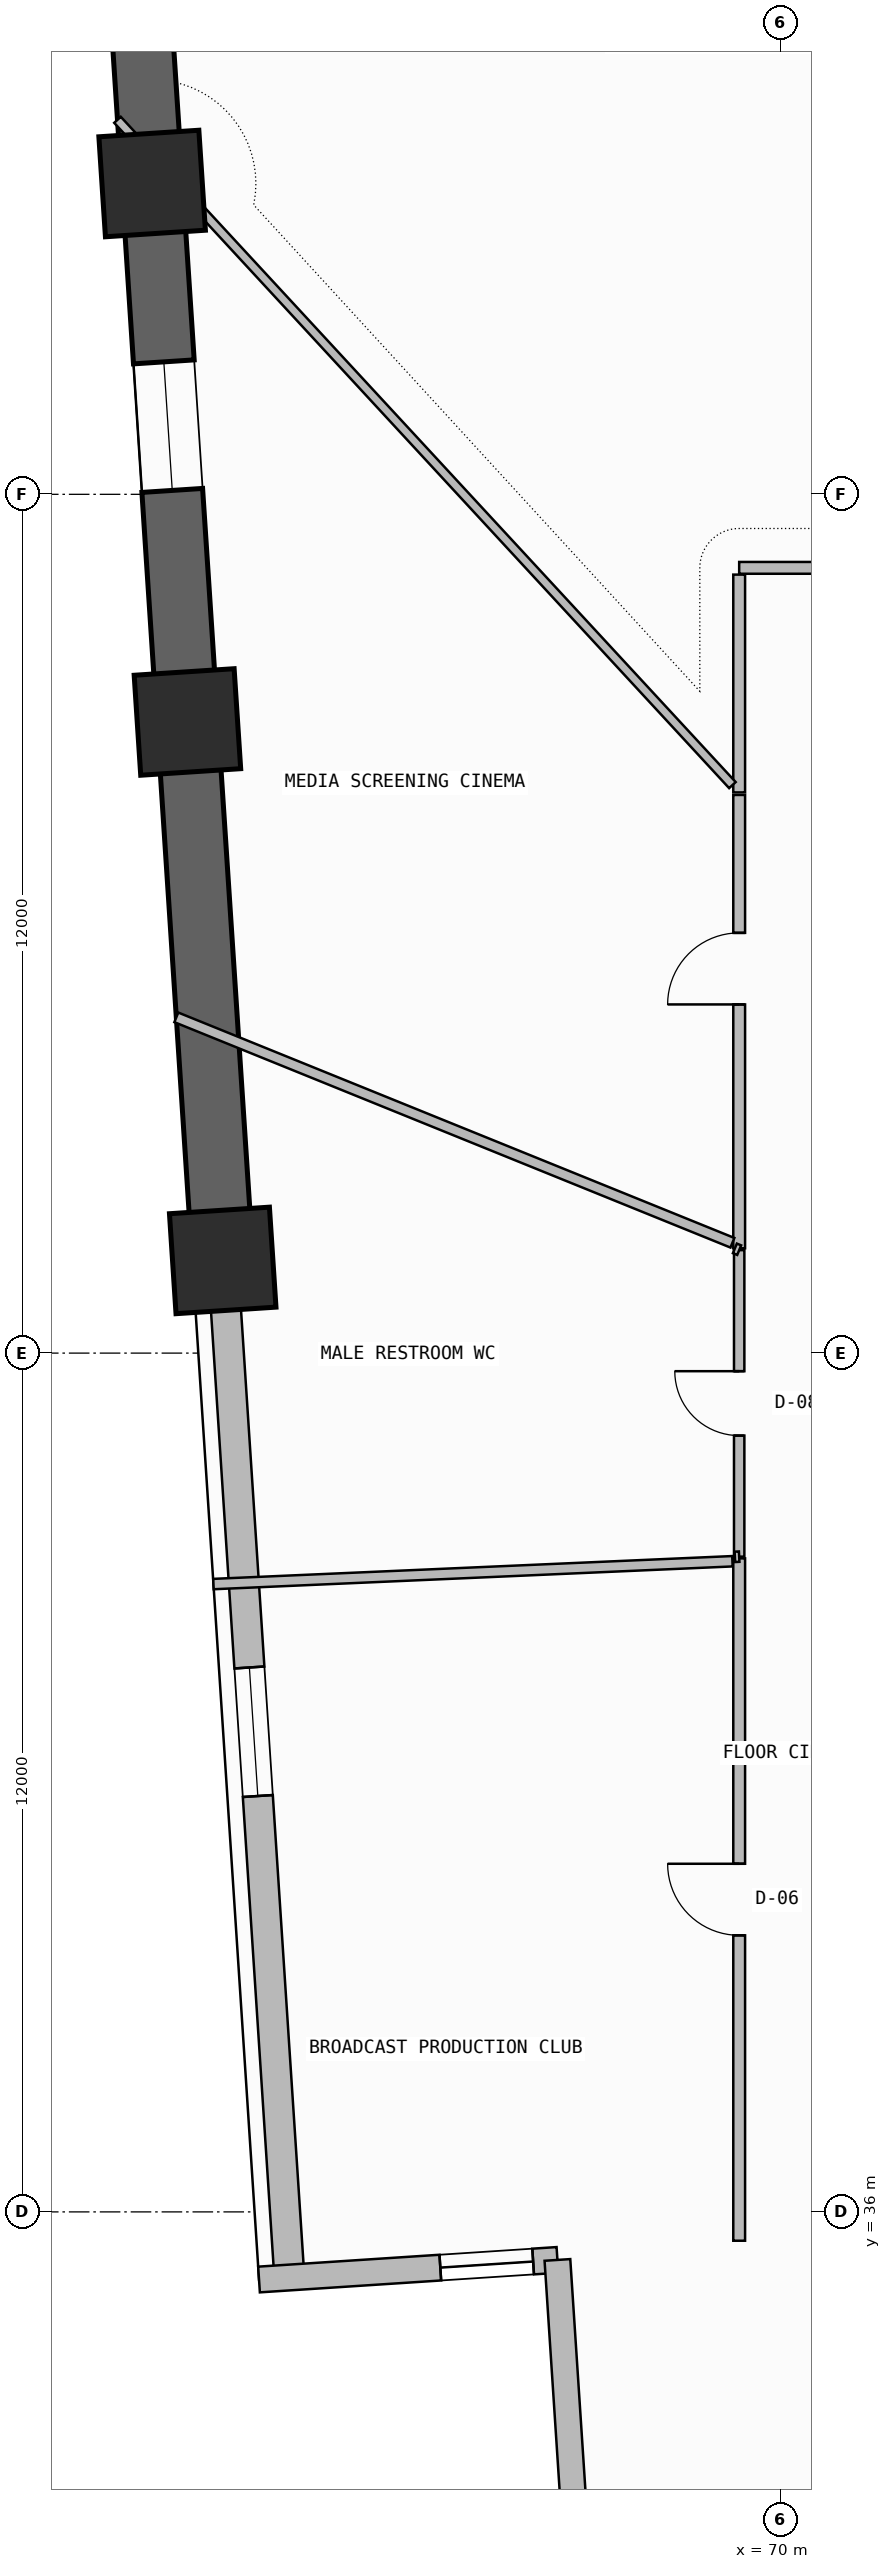
"""IFC4 building model, lengths in metres.
Left out: names, types, materials, properties, quantities, classifications, styles, units other than length and angle.
Written with IfcOpenShell. Run it as: python <this file> out.ifc"""

import sys

from ifc_helpers import new_model, si_unit, direction, frame, frame_2d, origin, origin_2d, place, context, subcontext, project, spatial, rectangle, extrude, element, fill, save


model = new_model("IFC4")
c1 = context("Model", 3, precision=1e-05, world=origin(), true_north=direction((0.0, 1.0)))
c2 = subcontext(c1, "Body", "Model", "MODEL_VIEW")
j1 = project(units=[si_unit("LENGTHUNIT", "METRE"), si_unit("PLANEANGLEUNIT", "RADIAN")], contexts=[c1])
p1 = place(None, origin())
s1 = spatial("IfcSite", under=j1, at=p1, CompositionType="ELEMENT")
p2 = place(p1, origin())
s2 = spatial("IfcBuilding", under=s1, at=p2, CompositionType="ELEMENT")
p3 = place(p2, frame((0.0, 0.0, 84.9)))
s3 = spatial("IfcBuildingStorey", under=s2, at=p3, CompositionType="ELEMENT", Elevation=84.9)
for number, where, z_axis, x_axis in (
    (1, (61.224, 64.343, 0.0), (0.0, 0.0, 1.0), (-0.065, 0.998, 0.0)),
    (2, (61.717, 56.819, 0.0), (0.0, 0.0, 1.0), (-0.065, 0.998, 0.0)),
    (3, (62.21, 49.295, 0.0), (0.0, 0.0, 1.0), (-0.065, 0.998, 0.0)),
):
    element("IfcColumn", number, at=place(p3, frame(where, z_axis=z_axis, x_axis=x_axis)), inside=s3, PredefinedType="COLUMN", context=c2, shape_type="SweptSolid", body=[
        extrude(rectangle(XDim=1.4, YDim=1.4, at=origin_2d()), origin(), (0.0, 0.0, 1.0), 3.6),
    ])
p4 = place(p3, frame((67.133, 31.583, 0.0), z_axis=(0.0, 0.0, 1.0), x_axis=(0.997859040617, 0.065401338356, 0.0)))
e4 = element("IfcWall", 4, at=p4, inside=s3, PredefinedType="SOLIDWALL", context=c2, shape_type="SweptSolid", body=[
    extrude(rectangle(XDim=17.862, YDim=0.42, at=frame_2d((8.931, 0.0))), origin(), (0.0, 0.0, 1.0), 2.325),
])
p5 = place(p4, frame((5.7, 0.0, 1.2)))
e5 = element("IfcOpeningElement", 5, at=p5, cuts=e4, PredefinedType="OPENING", context=c2, shape_type="SweptSolid", body=[
    extrude(rectangle(XDim=2.4, YDim=0.9, at=frame_2d((1.2, 0.45))), frame((0.0, 0.22, 0.0), z_axis=(0.0, -1.0, 0.0), x_axis=(1.0, 0.0, 0.0)), (0.0, 0.0, 1.0), 0.44),
])
p6 = place(p3, frame((60.785, 71.031, -0.26), z_axis=(0.0, 0.0, 1.0), x_axis=(0.065409824833, -0.997858484363, 0.0)))
e6 = element("IfcWall", 6, at=p6, inside=s3, PredefinedType="SHEAR", context=c2, shape_type="SweptSolid", body=[
    extrude(rectangle(XDim=21.783, YDim=0.85, at=frame_2d((10.891, 0.0))), origin(), (0.0, 0.0, 1.0), 3.6),
])
p7 = place(p6, frame((9.2, 0.0, 1.2)))
e7 = element("IfcOpeningElement", 7, at=p7, cuts=e6, PredefinedType="OPENING", context=c2, shape_type="SweptSolid", body=[
    extrude(rectangle(XDim=1.8, YDim=0.9, at=frame_2d((0.9, 0.45))), frame((0.0, 0.435, 0.0), z_axis=(0.0, -1.0, 0.0), x_axis=(1.0, 0.0, 0.0)), (0.0, 0.0, 1.0), 0.87),
])
p8 = place(p3, frame((62.21, 49.295, 0.0), z_axis=(0.0, 0.0, 1.0), x_axis=(0.065396027757, -0.997859388668, 0.0)))
e8 = element("IfcWall", 8, at=p8, inside=s3, PredefinedType="SOLIDWALL", context=c2, shape_type="SweptSolid", body=[
    extrude(rectangle(XDim=14.242, YDim=0.42, at=frame_2d((7.121, 0.0))), origin(), (0.0, 0.0, 1.0), 2.325),
])
p9 = place(p8, frame((5.7, 0.0, 1.2)))
e9 = element("IfcOpeningElement", 9, at=p9, cuts=e8, PredefinedType="OPENING", context=c2, shape_type="SweptSolid", body=[
    extrude(rectangle(XDim=1.8, YDim=0.9, at=frame_2d((0.9, 0.45))), frame((0.0, 0.22, 0.0), z_axis=(0.0, -1.0, 0.0), x_axis=(1.0, 0.0, 0.0)), (0.0, 0.0, 1.0), 0.44),
])
p10 = place(p3, frame((62.718, 35.055, 0.0), z_axis=(0.0, 0.0, 1.0), x_axis=(0.997860761953, 0.065375069826, 0.0)))
e10 = element("IfcWall", 10, at=p10, inside=s3, PredefinedType="SOLIDWALL", context=c2, shape_type="SweptSolid", body=[
    extrude(rectangle(XDim=4.179, YDim=0.36, at=frame_2d((2.089, 0.0))), origin(), (0.0, 0.0, 1.0), 3.34),
])
p11 = place(p10, frame((2.539, 0.0, 0.45)))
e11 = element("IfcOpeningElement", 11, at=p11, cuts=e10, PredefinedType="OPENING", context=c2, shape_type="SweptSolid", body=[
    extrude(rectangle(XDim=1.3, YDim=2.4, at=frame_2d((0.65, 1.2))), frame((0.0, 0.19, 0.0), z_axis=(0.0, -1.0, 0.0), x_axis=(1.0, 0.0, 0.0)), (0.0, 0.0, 1.0), 0.38),
])
p12 = place(p3, frame((66.887, 35.329, 0.0), z_axis=(0.0, 0.0, 1.0), x_axis=(0.065433242561, -0.99785694905, 0.0)))
e12 = element("IfcWall", 12, at=p12, inside=s3, PredefinedType="SOLIDWALL", context=c2, shape_type="SweptSolid", body=[
    extrude(rectangle(XDim=4.179, YDim=0.36, at=frame_2d((2.089, 0.0))), origin(), (0.0, 0.0, 1.0), 3.34),
])
p13 = place(p3, frame((84.682, 65.372, 0.0), z_axis=(0.0, 0.0, 1.0), x_axis=(-0.842418773655, 0.538823356763, 0.0)))
e13 = element("IfcWall", 13, at=p13, inside=s3, PredefinedType="PARAPET", context=c2, shape_type="SweptSolid", body=[
    extrude(rectangle(XDim=19.612, YDim=0.2, at=frame_2d((9.806, 0.0))), origin(), (0.0, 0.0, 1.0), 1.15),
])
p14 = place(p3, frame((69.427, 45.132, 0.0), z_axis=(0.0, 0.0, 1.0), x_axis=(0.0, -1.0, 0.0)))
e14 = element("IfcWall", 14, at=p14, inside=s3, PredefinedType="PARTITIONING", context=c2, shape_type="SweptSolid", body=[
    extrude(rectangle(XDim=9.535, YDim=0.165, at=frame_2d((4.767, 0.0))), origin(), (0.0, 0.0, 1.0), 3.34),
])
p15 = place(p14, frame((4.267, 0.0, 0.0)))
e15 = element("IfcOpeningElement", 15, at=p15, cuts=e14, PredefinedType="OPENING", context=c2, shape_type="SweptSolid", body=[
    extrude(rectangle(XDim=1.0, YDim=2.2, at=frame_2d((0.5, 1.1))), frame((0.0, 0.093, 0.0), z_axis=(0.0, -1.0, 0.0), x_axis=(1.0, 0.0, 0.0)), (0.0, 0.0, 1.0), 0.185),
])
p16 = place(p3, frame((62.081, 44.773, 0.0), z_axis=(0.0, 0.0, 1.0), x_axis=(0.999036449183, 0.043888189799, 0.0)))
e16 = element("IfcWall", 16, at=p16, inside=s3, PredefinedType="PARTITIONING", context=c2, shape_type="SweptSolid", body=[
    extrude(rectangle(XDim=7.26, YDim=0.145, at=frame_2d((3.63, 0.0))), origin(), (0.0, 0.0, 1.0), 3.34),
])
p17 = place(p3, frame((79.16, 58.972, 0.0), z_axis=(0.0, 0.0, 1.0), x_axis=(-1.0, 0.0, 0.0)))
e17 = element("IfcWall", 17, at=p17, inside=s3, PredefinedType="PARTITIONING", context=c2, shape_type="SweptSolid", body=[
    extrude(rectangle(XDim=9.733, YDim=0.165, at=frame_2d((4.866, 0.0))), origin(), (0.0, 0.0, 1.0), 2.725),
])
p18 = place(p17, frame((3.117, 0.0, 0.0)))
e18 = element("IfcOpeningElement", 18, at=p18, cuts=e17, PredefinedType="OPENING", context=c2, shape_type="SweptSolid", body=[
    extrude(rectangle(XDim=1.0, YDim=2.2, at=frame_2d((0.5, 1.1))), frame((0.0, 0.093, 0.0), z_axis=(0.0, -1.0, 0.0), x_axis=(1.0, 0.0, 0.0)), (0.0, 0.0, 1.0), 0.185),
])
p19 = place(p3, frame((69.427, 58.878, 0.0), z_axis=(0.0, 0.0, 1.0), x_axis=(0.0, -1.0, 0.0)))
e19 = element("IfcWall", 19, at=p19, inside=s3, PredefinedType="PARTITIONING", context=c2, shape_type="SweptSolid", body=[
    extrude(rectangle(XDim=3.043, YDim=0.165, at=frame_2d((1.521, 0.0))), origin(), (0.0, 0.0, 1.0), 2.725),
])
p20 = place(p3, frame((69.333, 55.937, 0.0), z_axis=(0.0, 0.0, 1.0), x_axis=(-0.678801357596, 0.73432194365, 0.0)))
e20 = element("IfcWall", 20, at=p20, inside=s3, PredefinedType="PARTITIONING", context=c2, shape_type="SweptSolid", body=[
    extrude(rectangle(XDim=12.66, YDim=0.125, at=frame_2d((6.33, 0.0))), origin(), (0.0, 0.0, 1.0), 2.325),
])
p21 = place(p3, frame((69.427, 55.799, 0.0), z_axis=(0.0, 0.0, 1.0), x_axis=(0.0, -1.0, 0.0)))
e21 = element("IfcWall", 21, at=p21, inside=s3, PredefinedType="PARTITIONING", context=c2, shape_type="SweptSolid", body=[
    extrude(rectangle(XDim=6.334, YDim=0.165, at=frame_2d((3.167, 0.0))), origin(), (0.0, 0.0, 1.0), 2.725),
])
p22 = place(p21, frame((1.927, 0.0, 0.0)))
e22 = element("IfcOpeningElement", 22, at=p22, cuts=e21, PredefinedType="OPENING", context=c2, shape_type="SweptSolid", body=[
    extrude(rectangle(XDim=1.0, YDim=2.2, at=frame_2d((0.5, 1.1))), frame((0.0, 0.093, 0.0), z_axis=(0.0, -1.0, 0.0), x_axis=(1.0, 0.0, 0.0)), (0.0, 0.0, 1.0), 0.185),
])
p23 = place(p3, frame((69.333, 49.542, 0.0), z_axis=(0.0, 0.0, 1.0), x_axis=(-0.926778441971, 0.375608465691, 0.0)))
e23 = element("IfcWall", 23, at=p23, inside=s3, PredefinedType="PARTITIONING", context=c2, shape_type="SweptSolid", body=[
    extrude(rectangle(XDim=8.385, YDim=0.145, at=frame_2d((4.193, 0.0))), origin(), (0.0, 0.0, 1.0), 2.325),
])
p24 = place(p3, frame((69.427, 49.439, 0.0), z_axis=(0.0, 0.0, 1.0), x_axis=(0.0, -1.0, 0.0)))
e24 = element("IfcWall", 24, at=p24, inside=s3, PredefinedType="PARTITIONING", context=c2, shape_type="SweptSolid", body=[
    extrude(rectangle(XDim=4.283, YDim=0.145, at=frame_2d((2.141, 0.0))), origin(), (0.0, 0.0, 1.0), 3.34),
])
p25 = place(p24, frame((1.691, 0.0, 0.0)))
e25 = element("IfcOpeningElement", 25, at=p25, cuts=e24, PredefinedType="OPENING", context=c2, shape_type="SweptSolid", body=[
    extrude(rectangle(XDim=0.9, YDim=2.1, at=frame_2d((0.45, 1.05))), frame((0.0, 0.083, 0.0), z_axis=(0.0, -1.0, 0.0), x_axis=(1.0, 0.0, 0.0)), (0.0, 0.0, 1.0), 0.165),
])
p26 = place(p3, frame((69.367, 49.463, 0.0), z_axis=(0.0, 0.0, 1.0), x_axis=(0.92506700906, -0.379803934614, 0.0)))
e26 = element("IfcWall", 26, at=p26, inside=s3, PredefinedType="PARTITIONING", context=c2, shape_type="SweptSolid", body=[
    extrude(rectangle(XDim=0.065, YDim=0.145, at=frame_2d((0.032, 0.0))), origin(), (0.0, 0.0, 1.0), 3.34),
])
p27 = place(p3, frame((69.427, 45.156, 0.0), z_axis=(0.0, 0.0, 1.0), x_axis=(-0.998606592857, -0.052771893118, 0.0)))
e27 = element("IfcWall", 27, at=p27, inside=s3, PredefinedType="PARTITIONING", context=c2, shape_type="SweptSolid", body=[
    extrude(rectangle(XDim=0.06, YDim=0.145, at=frame_2d((0.03, 0.0))), origin(), (0.0, 0.0, 1.0), 3.34),
])
p28 = place(p7, origin())
e28 = element("IfcWindow", 28, at=p28, inside=s3, PartitioningType="SINGLE_PANEL", PredefinedType="WINDOW", context=c2, shape_type="SweptSolid", body=[
    extrude(rectangle(XDim=1.8, YDim=0.9, at=frame_2d((0.9, 0.45))), frame((0.0, 0.03, 0.0), z_axis=(0.0, -1.0, 0.0), x_axis=(1.0, 0.0, 0.0)), (0.0, 0.0, 1.0), 0.06),
])
fill(e7, e28)
p29 = place(p9, origin())
e29 = element("IfcWindow", 29, at=p29, inside=s3, PartitioningType="SINGLE_PANEL", PredefinedType="WINDOW", context=c2, shape_type="SweptSolid", body=[
    extrude(rectangle(XDim=1.8, YDim=0.9, at=frame_2d((0.9, 0.45))), frame((0.0, 0.03, 0.0), z_axis=(0.0, -1.0, 0.0), x_axis=(1.0, 0.0, 0.0)), (0.0, 0.0, 1.0), 0.06),
])
fill(e9, e29)
p30 = place(p11, origin())
e30 = element("IfcWindow", 30, at=p30, inside=s3, PartitioningType="SINGLE_PANEL", PredefinedType="WINDOW", context=c2, shape_type="SweptSolid", body=[
    extrude(rectangle(XDim=1.3, YDim=2.4, at=frame_2d((0.65, 1.2))), frame((0.0, 0.03, 0.0), z_axis=(0.0, -1.0, 0.0), x_axis=(1.0, 0.0, 0.0)), (0.0, 0.0, 1.0), 0.06),
])
fill(e11, e30)
p31 = place(p15, frame((1.0, 0.0, 0.0), z_axis=(0.0, 0.0, 1.0), x_axis=(-1.0, 0.0, 0.0)))
e31 = element("IfcDoor", 31, at=p31, inside=s3, OperationType="SINGLE_SWING_RIGHT", PredefinedType="DOOR", context=c2, shape_type="SweptSolid", body=[
    extrude(rectangle(XDim=1.0, YDim=2.2, at=frame_2d((0.5, 1.1))), frame((0.0, 0.025, 0.0), z_axis=(0.0, -1.0, 0.0), x_axis=(1.0, 0.0, 0.0)), (0.0, 0.0, 1.0), 0.05),
])
fill(e15, e31)
p32 = place(p22, frame((1.0, 0.0, 0.0), z_axis=(0.0, 0.0, 1.0), x_axis=(-1.0, 0.0, 0.0)))
e32 = element("IfcDoor", 32, at=p32, inside=s3, OperationType="SINGLE_SWING_LEFT", PredefinedType="DOOR", context=c2, shape_type="SweptSolid", body=[
    extrude(rectangle(XDim=1.0, YDim=2.2, at=frame_2d((0.5, 1.1))), frame((0.0, 0.025, 0.0), z_axis=(0.0, -1.0, 0.0), x_axis=(1.0, 0.0, 0.0)), (0.0, 0.0, 1.0), 0.05),
])
fill(e22, e32)
p33 = place(p25, frame((0.9, 0.0, 0.0), z_axis=(0.0, 0.0, 1.0), x_axis=(-1.0, 0.0, 0.0)))
e33 = element("IfcDoor", 33, at=p33, inside=s3, OperationType="SINGLE_SWING_RIGHT", PredefinedType="DOOR", context=c2, shape_type="SweptSolid", body=[
    extrude(rectangle(XDim=0.9, YDim=2.1, at=frame_2d((0.45, 1.05))), frame((0.0, 0.025, 0.0), z_axis=(0.0, -1.0, 0.0), x_axis=(1.0, 0.0, 0.0)), (0.0, 0.0, 1.0), 0.05),
])
fill(e25, e33)
save(model, sys.argv[1])
